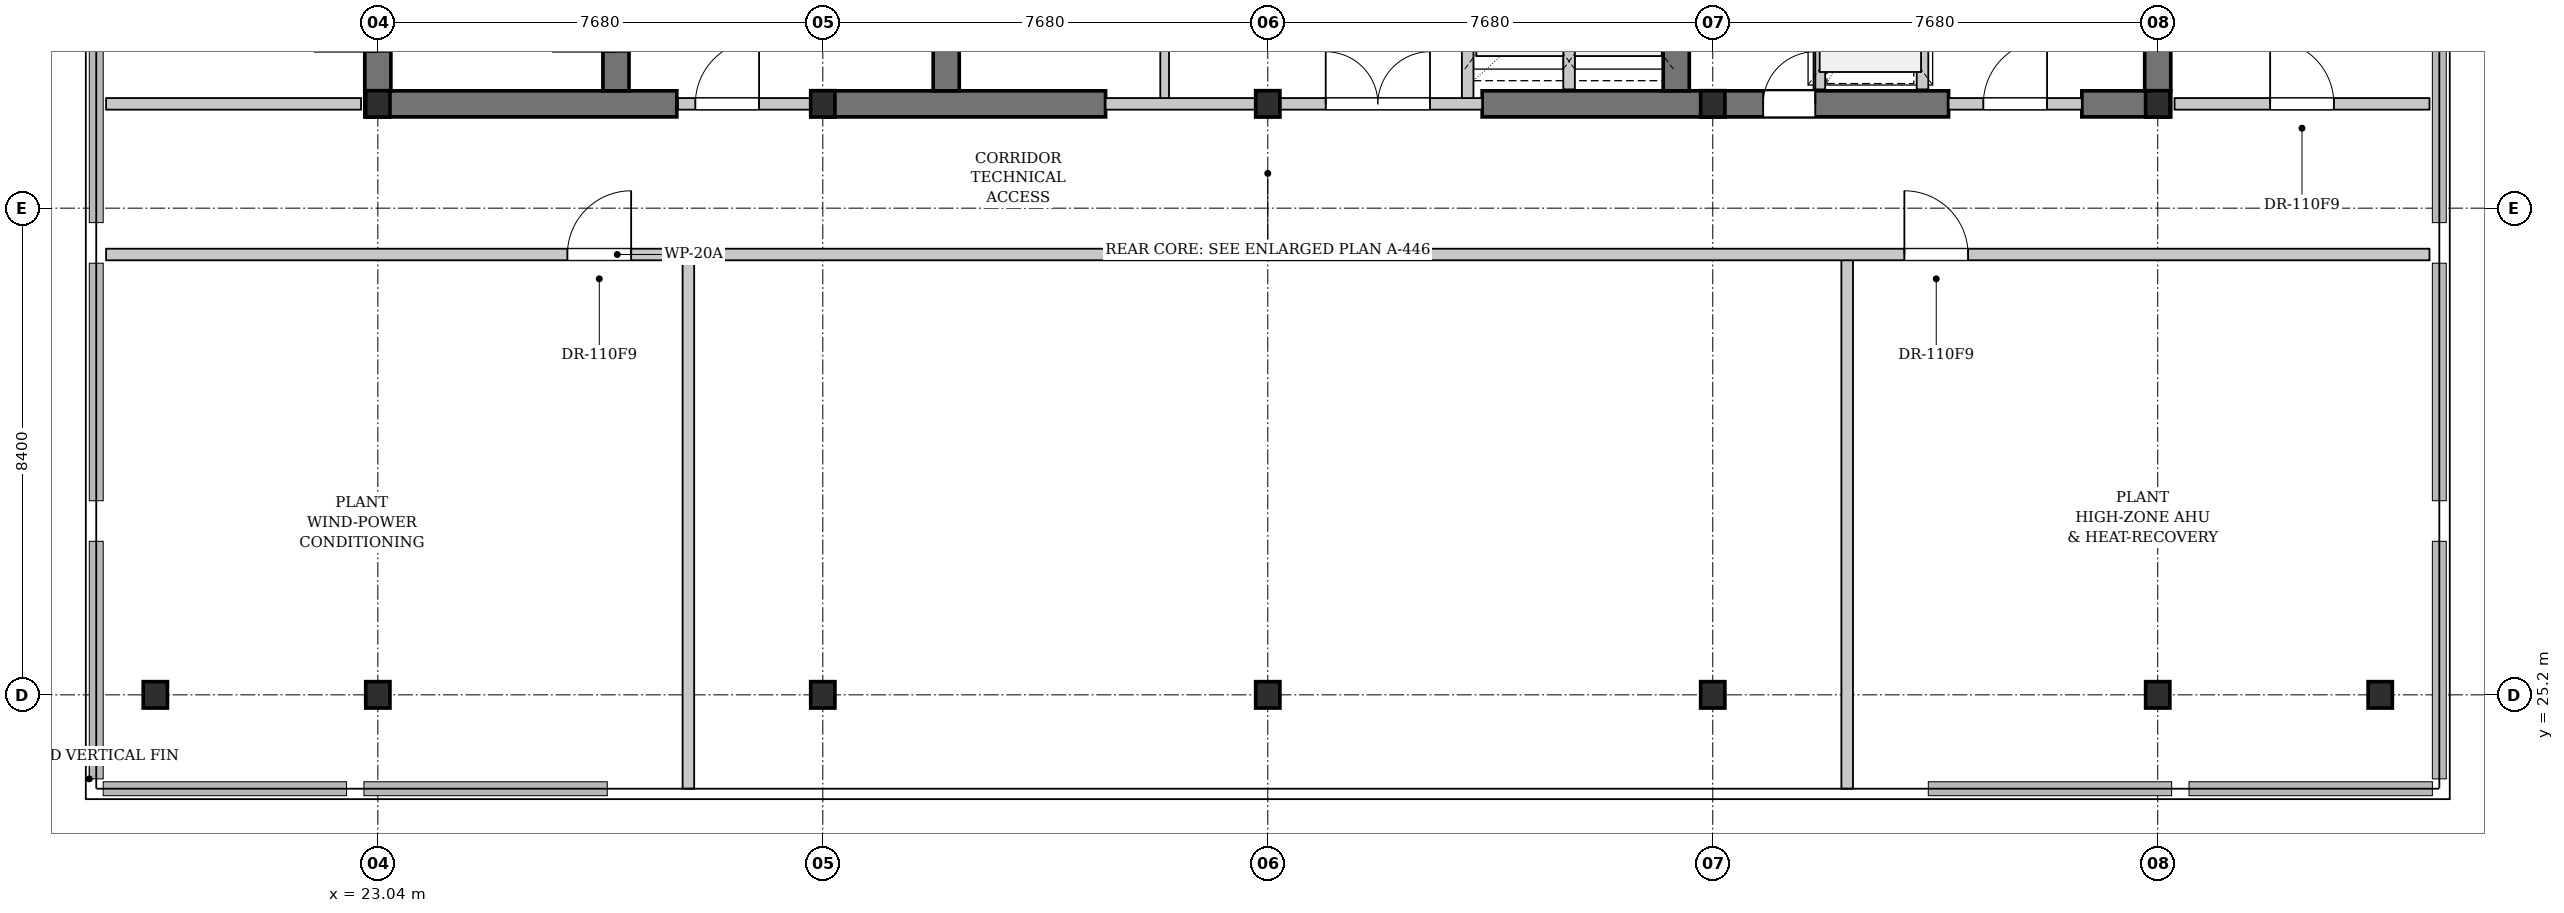
"""IFC4 building model, lengths in metres.
Left out: names, types, materials, properties, quantities, classifications, styles, units other than length and angle.
Written with IfcOpenShell. Run it as: python <this file> out.ifc"""

import sys

from ifc_helpers import new_model, si_unit, direction, frame, frame_2d, origin, origin_2d, place, context, subcontext, project, spatial, rectangle, i_section, extrude, element, fill, save


model = new_model("IFC4")
c1 = context("Model", 3, precision=1e-05, world=origin(), true_north=direction((0.0, 1.0)))
c2 = subcontext(c1, "Body", "Model", "MODEL_VIEW")
j1 = project(units=[si_unit("LENGTHUNIT", "METRE"), si_unit("PLANEANGLEUNIT", "RADIAN")], contexts=[c1])
p1 = place(None, origin())
s1 = spatial("IfcSite", under=j1, at=p1, CompositionType="ELEMENT")
p2 = place(p1, origin())
s2 = spatial("IfcBuilding", under=s1, at=p2, CompositionType="ELEMENT")
p3 = place(p2, frame((0.0, 0.0, 200.3)))
s3 = spatial("IfcBuildingStorey", under=s2, at=p3, CompositionType="ELEMENT", Elevation=200.3)
p4 = place(p3, frame((22.815, 35.4, 0.0), z_axis=(0.0, 0.0, 1.0), x_axis=(1.0, 0.0, 0.0)))
e1 = element("IfcWall", 1, at=p4, inside=s3, PredefinedType="SHEAR", context=c2, shape_type="SweptSolid", body=[
    extrude(rectangle(XDim=5.385, YDim=0.45, at=frame_2d((2.692, 0.0))), origin(), (0.0, 0.0, 1.0), 3.78),
])
p5 = place(p3, frame((30.72, 35.4, 0.0), z_axis=(0.0, 0.0, 1.0), x_axis=(1.0, 0.0, 0.0)))
e2 = element("IfcWall", 2, at=p5, inside=s3, PredefinedType="SHEAR", context=c2, shape_type="SweptSolid", body=[
    extrude(rectangle(XDim=4.88, YDim=0.45, at=frame_2d((2.44, 0.0))), origin(), (0.0, 0.0, 1.0), 3.78),
])
p6 = place(p3, frame((42.1, 35.4, 0.0), z_axis=(0.0, 0.0, 1.0), x_axis=(1.0, 0.0, 0.0)))
e3 = element("IfcWall", 3, at=p6, inside=s3, PredefinedType="SHEAR", context=c2, shape_type="SweptSolid", body=[
    extrude(rectangle(XDim=8.05, YDim=0.45, at=frame_2d((4.025, 0.0))), origin(), (0.0, 0.0, 1.0), 3.78),
])
p7 = place(p6, frame((4.85, 0.0, 0.0)))
e4 = element("IfcOpeningElement", 4, at=p7, cuts=e3, PredefinedType="OPENING", context=c2, shape_type="SweptSolid", body=[
    extrude(rectangle(XDim=0.9, YDim=2.15, at=frame_2d((0.45, 1.075))), frame((0.0, 0.235, 0.0), z_axis=(0.0, -1.0, 0.0), x_axis=(1.0, 0.0, 0.0)), (0.0, 0.0, 1.0), 0.47),
])
p8 = place(p3, frame((52.45, 35.4, 0.0), z_axis=(0.0, 0.0, 1.0), x_axis=(1.0, 0.0, 0.0)))
e5 = element("IfcWall", 5, at=p8, inside=s3, PredefinedType="SHEAR", context=c2, shape_type="SweptSolid", body=[
    extrude(rectangle(XDim=1.535, YDim=0.45, at=frame_2d((0.768, 0.0))), origin(), (0.0, 0.0, 1.0), 3.78),
])
p9 = place(p3, frame((23.04, 35.625, 0.0), z_axis=(0.0, 0.0, 1.0), x_axis=(0.0, 1.0, 0.0)))
e6 = element("IfcWall", 6, at=p9, inside=s3, PredefinedType="SHEAR", context=c2, shape_type="SweptSolid", body=[
    extrude(rectangle(XDim=10.35, YDim=0.45, at=frame_2d((5.175, 0.0))), origin(), (0.0, 0.0, 1.0), 3.78),
])
p10 = place(p9, frame((0.675, 0.0, 0.0)))
e7 = element("IfcOpeningElement", 7, at=p10, cuts=e6, PredefinedType="OPENING", context=c2, shape_type="SweptSolid", body=[
    extrude(rectangle(XDim=1.1, YDim=2.15, at=frame_2d((0.55, 1.075))), frame((0.0, 0.235, 0.0), z_axis=(0.0, -1.0, 0.0), x_axis=(1.0, 0.0, 0.0)), (0.0, 0.0, 1.0), 0.47),
])
p11 = place(p3, frame((27.15, 35.625, 0.0), z_axis=(0.0, 0.0, 1.0), x_axis=(0.0, 1.0, 0.0)))
e8 = element("IfcWall", 8, at=p11, inside=s3, PredefinedType="SHEAR", context=c2, shape_type="SweptSolid", body=[
    extrude(rectangle(XDim=10.35, YDim=0.45, at=frame_2d((5.175, 0.0))), origin(), (0.0, 0.0, 1.0), 3.78),
])
p12 = place(p11, frame((0.675, 0.0, 0.0)))
e9 = element("IfcOpeningElement", 9, at=p12, cuts=e8, PredefinedType="OPENING", context=c2, shape_type="SweptSolid", body=[
    extrude(rectangle(XDim=1.1, YDim=2.15, at=frame_2d((0.55, 1.075))), frame((0.0, 0.235, 0.0), z_axis=(0.0, -1.0, 0.0), x_axis=(1.0, 0.0, 0.0)), (0.0, 0.0, 1.0), 0.47),
])
for number, where, z_axis, x_axis in (
    (10, (32.85, 35.625, 0.0), (0.0, 0.0, 1.0), (0.0, 1.0, 0.0)),
    (11, (45.45, 35.625, 0.0), (0.0, 0.0, 1.0), (0.0, 1.0, 0.0)),
    (12, (53.76, 35.625, 0.0), (0.0, 0.0, 1.0), (0.0, 1.0, 0.0)),
):
    element("IfcWall", number, at=place(p3, frame(where, z_axis=z_axis, x_axis=x_axis)), inside=s3, PredefinedType="SHEAR", context=c2, shape_type="SweptSolid", body=[
        extrude(rectangle(XDim=10.35, YDim=0.45, at=frame_2d((5.175, 0.0))), origin(), (0.0, 0.0, 1.0), 3.78),
    ])
for number, where, z_axis, x_axis in (
    (13, (23.04, 35.4, 0.0), (0.0, 0.0, 1.0), (1.0, 0.0, 0.0)),
    (14, (23.04, 25.2, 0.0), (0.0, 0.0, 1.0), (1.0, 0.0, 0.0)),
    (15, (30.72, 35.4, 0.0), (0.0, 0.0, 1.0), (1.0, 0.0, 0.0)),
    (16, (30.72, 25.2, 0.0), (0.0, 0.0, 1.0), (1.0, 0.0, 0.0)),
    (17, (38.4, 35.4, 0.0), (0.0, 0.0, 1.0), (1.0, 0.0, 0.0)),
    (18, (38.4, 25.2, 0.0), (0.0, 0.0, 1.0), (1.0, 0.0, 0.0)),
    (19, (46.08, 35.4, 0.0), (0.0, 0.0, 1.0), (1.0, 0.0, 0.0)),
    (20, (46.08, 25.2, 0.0), (0.0, 0.0, 1.0), (1.0, 0.0, 0.0)),
    (21, (53.76, 35.4, 0.0), (0.0, 0.0, 1.0), (1.0, 0.0, 0.0)),
    (22, (53.76, 25.2, 0.0), (0.0, 0.0, 1.0), (1.0, 0.0, 0.0)),
    (23, (19.2, 25.2, 0.0), (0.0, 0.0, 1.0), (1.0, 0.0, 0.0)),
    (24, (57.6, 25.2, 0.0), (0.0, 0.0, 1.0), (1.0, 0.0, 0.0)),
):
    element("IfcColumn", number, at=place(p3, frame(where, z_axis=z_axis, x_axis=x_axis)), inside=s3, PredefinedType="COLUMN", context=c2, shape_type="SweptSolid", body=[
        extrude(i_section(OverallWidth=0.418, OverallDepth=0.455, WebThickness=0.042, FlangeThickness=0.068, FilletRadius=0.015, at=origin_2d()), origin(), (0.0, 0.0, 1.0), 4.2),
    ])
p13 = place(p3, frame((28.22, 35.4, 0.0), z_axis=(0.0, 0.0, 1.0), x_axis=(1.0, 0.0, 0.0)))
e25 = element("IfcWall", 25, at=p13, inside=s3, PredefinedType="PARTITIONING", context=c2, shape_type="SweptSolid", body=[
    extrude(rectangle(XDim=2.5, YDim=0.2, at=frame_2d((1.25, 0.0))), origin(), (0.0, 0.0, 1.0), 2.961),
])
p14 = place(p13, frame((0.3, 0.0, 0.0)))
e26 = element("IfcOpeningElement", 26, at=p14, cuts=e25, PredefinedType="OPENING", context=c2, shape_type="SweptSolid", body=[
    extrude(rectangle(XDim=1.1, YDim=2.15, at=frame_2d((0.55, 1.075))), frame((0.0, 0.11, 0.0), z_axis=(0.0, -1.0, 0.0), x_axis=(1.0, 0.0, 0.0)), (0.0, 0.0, 1.0), 0.22),
])
p15 = place(p3, frame((35.6, 35.4, 0.0), z_axis=(0.0, 0.0, 1.0), x_axis=(1.0, 0.0, 0.0)))
e27 = element("IfcWall", 27, at=p15, inside=s3, PredefinedType="PARTITIONING", context=c2, shape_type="SweptSolid", body=[
    extrude(rectangle(XDim=6.5, YDim=0.2, at=frame_2d((3.25, 0.0))), origin(), (0.0, 0.0, 1.0), 2.575),
])
p16 = place(p15, frame((3.8, 0.0, 0.0)))
e28 = element("IfcOpeningElement", 28, at=p16, cuts=e27, PredefinedType="OPENING", context=c2, shape_type="SweptSolid", body=[
    extrude(rectangle(XDim=1.8, YDim=2.3, at=frame_2d((0.9, 1.15))), frame((0.0, 0.11, 0.0), z_axis=(0.0, -1.0, 0.0), x_axis=(1.0, 0.0, 0.0)), (0.0, 0.0, 1.0), 0.22),
])
p17 = place(p3, frame((36.62, 35.5, 0.0), z_axis=(0.0, 0.0, 1.0), x_axis=(0.0, 1.0, 0.0)))
e29 = element("IfcWall", 29, at=p17, inside=s3, PredefinedType="PARTITIONING", context=c2, shape_type="SweptSolid", body=[
    extrude(rectangle(XDim=10.42, YDim=0.15, at=frame_2d((5.21, 0.0))), origin(), (0.0, 0.0, 1.0), 3.78),
])
p18 = place(p17, frame((3.92, 0.0, 0.0)))
e30 = element("IfcOpeningElement", 30, at=p18, cuts=e29, PredefinedType="OPENING", context=c2, shape_type="SweptSolid", body=[
    extrude(rectangle(XDim=0.9, YDim=2.15, at=frame_2d((0.45, 1.075))), frame((0.0, 0.085, 0.0), z_axis=(0.0, -1.0, 0.0), x_axis=(1.0, 0.0, 0.0)), (0.0, 0.0, 1.0), 0.17),
])
p19 = place(p17, frame((5.85, 0.0, 0.0)))
e31 = element("IfcOpeningElement", 31, at=p19, cuts=e29, PredefinedType="OPENING", context=c2, shape_type="SweptSolid", body=[
    extrude(rectangle(XDim=0.9, YDim=2.15, at=frame_2d((0.45, 1.075))), frame((0.0, 0.085, 0.0), z_axis=(0.0, -1.0, 0.0), x_axis=(1.0, 0.0, 0.0)), (0.0, 0.0, 1.0), 0.17),
])
p20 = place(p3, frame((43.6, 35.65, 0.0), z_axis=(0.0, 0.0, 1.0), x_axis=(0.0, 1.0, 0.0)))
e32 = element("IfcWall", 32, at=p20, inside=s3, PredefinedType="PARTITIONING", context=c2, shape_type="SweptSolid", body=[
    extrude(rectangle(XDim=3.25, YDim=0.2, at=frame_2d((1.625, 0.0))), origin(), (0.0, 0.0, 1.0), 3.78),
])
p21 = place(p3, frame((41.85, 35.5, 0.0), z_axis=(0.0, 0.0, 1.0), x_axis=(0.0, 1.0, 0.0)))
e33 = element("IfcWall", 33, at=p21, inside=s3, PredefinedType="PARTITIONING", context=c2, shape_type="SweptSolid", body=[
    extrude(rectangle(XDim=3.4, YDim=0.2, at=frame_2d((1.7, 0.0))), origin(), (0.0, 0.0, 1.0), 3.78),
])
p22 = place(p3, frame((50.15, 35.4, 0.0), z_axis=(0.0, 0.0, 1.0), x_axis=(1.0, 0.0, 0.0)))
e34 = element("IfcWall", 34, at=p22, inside=s3, PredefinedType="PARTITIONING", context=c2, shape_type="SweptSolid", body=[
    extrude(rectangle(XDim=2.3, YDim=0.2, at=frame_2d((1.15, 0.0))), origin(), (0.0, 0.0, 1.0), 2.961),
])
p23 = place(p22, frame((0.6, 0.0, 0.0)))
e35 = element("IfcOpeningElement", 35, at=p23, cuts=e34, PredefinedType="OPENING", context=c2, shape_type="SweptSolid", body=[
    extrude(rectangle(XDim=1.1, YDim=2.15, at=frame_2d((0.55, 1.075))), frame((0.0, 0.11, 0.0), z_axis=(0.0, -1.0, 0.0), x_axis=(1.0, 0.0, 0.0)), (0.0, 0.0, 1.0), 0.22),
])
p24 = place(p3, frame((49.7, 35.65, 0.0), z_axis=(0.0, 0.0, 1.0), x_axis=(0.0, 1.0, 0.0)))
e36 = element("IfcWall", 36, at=p24, inside=s3, PredefinedType="PARTITIONING", context=c2, shape_type="SweptSolid", body=[
    extrude(rectangle(XDim=3.15, YDim=0.2, at=frame_2d((1.575, 0.0))), origin(), (0.0, 0.0, 1.0), 3.78),
])
p25 = place(p24, frame((0.85, 0.0, 0.0)))
e37 = element("IfcOpeningElement", 37, at=p25, cuts=e36, PredefinedType="OPENING", context=c2, shape_type="SweptSolid", body=[
    extrude(rectangle(XDim=1.2, YDim=2.2, at=frame_2d((0.6, 1.1))), frame((0.0, 0.11, 0.0), z_axis=(0.0, -1.0, 0.0), x_axis=(1.0, 0.0, 0.0)), (0.0, 0.0, 1.0), 0.22),
])
p26 = place(p3, frame((47.92, 35.65, 0.0), z_axis=(0.0, 0.0, 1.0), x_axis=(0.0, 1.0, 0.0)))
e38 = element("IfcWall", 38, at=p26, inside=s3, PredefinedType="PARTITIONING", context=c2, shape_type="SweptSolid", body=[
    extrude(rectangle(XDim=3.15, YDim=0.2, at=frame_2d((1.575, 0.0))), origin(), (0.0, 0.0, 1.0), 3.78),
])
p27 = place(p3, frame((18.35, 35.4, 0.0), z_axis=(0.0, 0.0, 1.0), x_axis=(1.0, 0.0, 0.0)))
e39 = element("IfcWall", 39, at=p27, inside=s3, PredefinedType="PARTITIONING", context=c2, shape_type="SweptSolid", body=[
    extrude(rectangle(XDim=4.4, YDim=0.2, at=frame_2d((2.2, 0.0))), origin(), (0.0, 0.0, 1.0), 3.78),
])
p28 = place(p3, frame((54.05, 35.4, 0.0), z_axis=(0.0, 0.0, 1.0), x_axis=(1.0, 0.0, 0.0)))
e40 = element("IfcWall", 40, at=p28, inside=s3, PredefinedType="PARTITIONING", context=c2, shape_type="SweptSolid", body=[
    extrude(rectangle(XDim=4.4, YDim=0.2, at=frame_2d((2.2, 0.0))), origin(), (0.0, 0.0, 1.0), 3.78),
])
p29 = place(p28, frame((1.65, 0.0, 0.0)))
e41 = element("IfcOpeningElement", 41, at=p29, cuts=e40, PredefinedType="OPENING", context=c2, shape_type="SweptSolid", body=[
    extrude(rectangle(XDim=1.1, YDim=2.15, at=frame_2d((0.55, 1.075))), frame((0.0, 0.11, 0.0), z_axis=(0.0, -1.0, 0.0), x_axis=(1.0, 0.0, 0.0)), (0.0, 0.0, 1.0), 0.22),
])
for number, where, z_axis, x_axis in (
    (42, (28.4, 23.58, 0.0), (0.0, 0.0, 1.0), (0.0, 1.0, 0.0)),
    (43, (48.4, 23.58, 0.0), (0.0, 0.0, 1.0), (0.0, 1.0, 0.0)),
):
    element("IfcWall", number, at=place(p3, frame(where, z_axis=z_axis, x_axis=x_axis)), inside=s3, PredefinedType="PARTITIONING", context=c2, shape_type="SweptSolid", body=[
        extrude(rectangle(XDim=9.22, YDim=0.2, at=frame_2d((4.61, 0.0))), origin(), (0.0, 0.0, 1.0), 3.78),
    ])
p30 = place(p3, frame((18.35, 32.8, 0.0), z_axis=(0.0, 0.0, 1.0), x_axis=(1.0, 0.0, 0.0)))
e44 = element("IfcWall", 44, at=p30, inside=s3, PredefinedType="PARTITIONING", context=c2, shape_type="SweptSolid", body=[
    extrude(rectangle(XDim=40.1, YDim=0.2, at=frame_2d((20.05, 0.0))), origin(), (0.0, 0.0, 1.0), 2.575),
])
p31 = place(p30, frame((7.962, 0.0, 0.0)))
e45 = element("IfcOpeningElement", 45, at=p31, cuts=e44, PredefinedType="OPENING", context=c2, shape_type="SweptSolid", body=[
    extrude(rectangle(XDim=1.1, YDim=2.15, at=frame_2d((0.55, 1.075))), frame((0.0, 0.11, 0.0), z_axis=(0.0, -1.0, 0.0), x_axis=(1.0, 0.0, 0.0)), (0.0, 0.0, 1.0), 0.22),
])
p32 = place(p30, frame((31.037, 0.0, 0.0)))
e46 = element("IfcOpeningElement", 46, at=p32, cuts=e44, PredefinedType="OPENING", context=c2, shape_type="SweptSolid", body=[
    extrude(rectangle(XDim=1.1, YDim=2.15, at=frame_2d((0.55, 1.075))), frame((0.0, 0.11, 0.0), z_axis=(0.0, -1.0, 0.0), x_axis=(1.0, 0.0, 0.0)), (0.0, 0.0, 1.0), 0.22),
])
p33 = place(p14, origin())
e47 = element("IfcDoor", 47, at=p33, inside=s3, OperationType="SINGLE_SWING_RIGHT", PredefinedType="DOOR", context=c2, shape_type="SweptSolid", body=[
    extrude(rectangle(XDim=1.1, YDim=2.15, at=frame_2d((0.55, 1.075))), frame((0.0, 0.025, 0.0), z_axis=(0.0, -1.0, 0.0), x_axis=(1.0, 0.0, 0.0)), (0.0, 0.0, 1.0), 0.05),
])
fill(e26, e47)
p34 = place(p16, origin())
e48 = element("IfcDoor", 48, at=p34, inside=s3, OperationType="DOUBLE_DOOR_SINGLE_SWING", PredefinedType="DOOR", context=c2, shape_type="SweptSolid", body=[
    extrude(rectangle(XDim=1.8, YDim=2.3, at=frame_2d((0.9, 1.15))), frame((0.0, 0.025, 0.0), z_axis=(0.0, -1.0, 0.0), x_axis=(1.0, 0.0, 0.0)), (0.0, 0.0, 1.0), 0.05),
])
fill(e28, e48)
p35 = place(p23, origin())
e49 = element("IfcDoor", 49, at=p35, inside=s3, OperationType="SINGLE_SWING_RIGHT", PredefinedType="DOOR", context=c2, shape_type="SweptSolid", body=[
    extrude(rectangle(XDim=1.1, YDim=2.15, at=frame_2d((0.55, 1.075))), frame((0.0, 0.025, 0.0), z_axis=(0.0, -1.0, 0.0), x_axis=(1.0, 0.0, 0.0)), (0.0, 0.0, 1.0), 0.05),
])
fill(e35, e49)
p36 = place(p29, origin())
e50 = element("IfcDoor", 50, at=p36, inside=s3, OperationType="SINGLE_SWING_LEFT", PredefinedType="DOOR", context=c2, shape_type="SweptSolid", body=[
    extrude(rectangle(XDim=1.1, YDim=2.15, at=frame_2d((0.55, 1.075))), frame((0.0, 0.025, 0.0), z_axis=(0.0, -1.0, 0.0), x_axis=(1.0, 0.0, 0.0)), (0.0, 0.0, 1.0), 0.05),
])
fill(e41, e50)
p37 = place(p31, origin())
e51 = element("IfcDoor", 51, at=p37, inside=s3, OperationType="SINGLE_SWING_RIGHT", PredefinedType="DOOR", context=c2, shape_type="SweptSolid", body=[
    extrude(rectangle(XDim=1.1, YDim=2.15, at=frame_2d((0.55, 1.075))), frame((0.0, 0.025, 0.0), z_axis=(0.0, -1.0, 0.0), x_axis=(1.0, 0.0, 0.0)), (0.0, 0.0, 1.0), 0.05),
])
fill(e45, e51)
p38 = place(p32, origin())
e52 = element("IfcDoor", 52, at=p38, inside=s3, OperationType="SINGLE_SWING_LEFT", PredefinedType="DOOR", context=c2, shape_type="SweptSolid", body=[
    extrude(rectangle(XDim=1.1, YDim=2.15, at=frame_2d((0.55, 1.075))), frame((0.0, 0.025, 0.0), z_axis=(0.0, -1.0, 0.0), x_axis=(1.0, 0.0, 0.0)), (0.0, 0.0, 1.0), 0.05),
])
fill(e46, e52)
p39 = place(p7, origin())
e53 = element("IfcDoor", 53, at=p39, inside=s3, OperationType="SINGLE_SWING_RIGHT", PredefinedType="DOOR", context=c2, shape_type="SweptSolid", body=[
    extrude(rectangle(XDim=0.9, YDim=2.15, at=frame_2d((0.45, 1.075))), frame((0.0, 0.025, 0.0), z_axis=(0.0, -1.0, 0.0), x_axis=(1.0, 0.0, 0.0)), (0.0, 0.0, 1.0), 0.05),
])
fill(e4, e53)
save(model, sys.argv[1])
